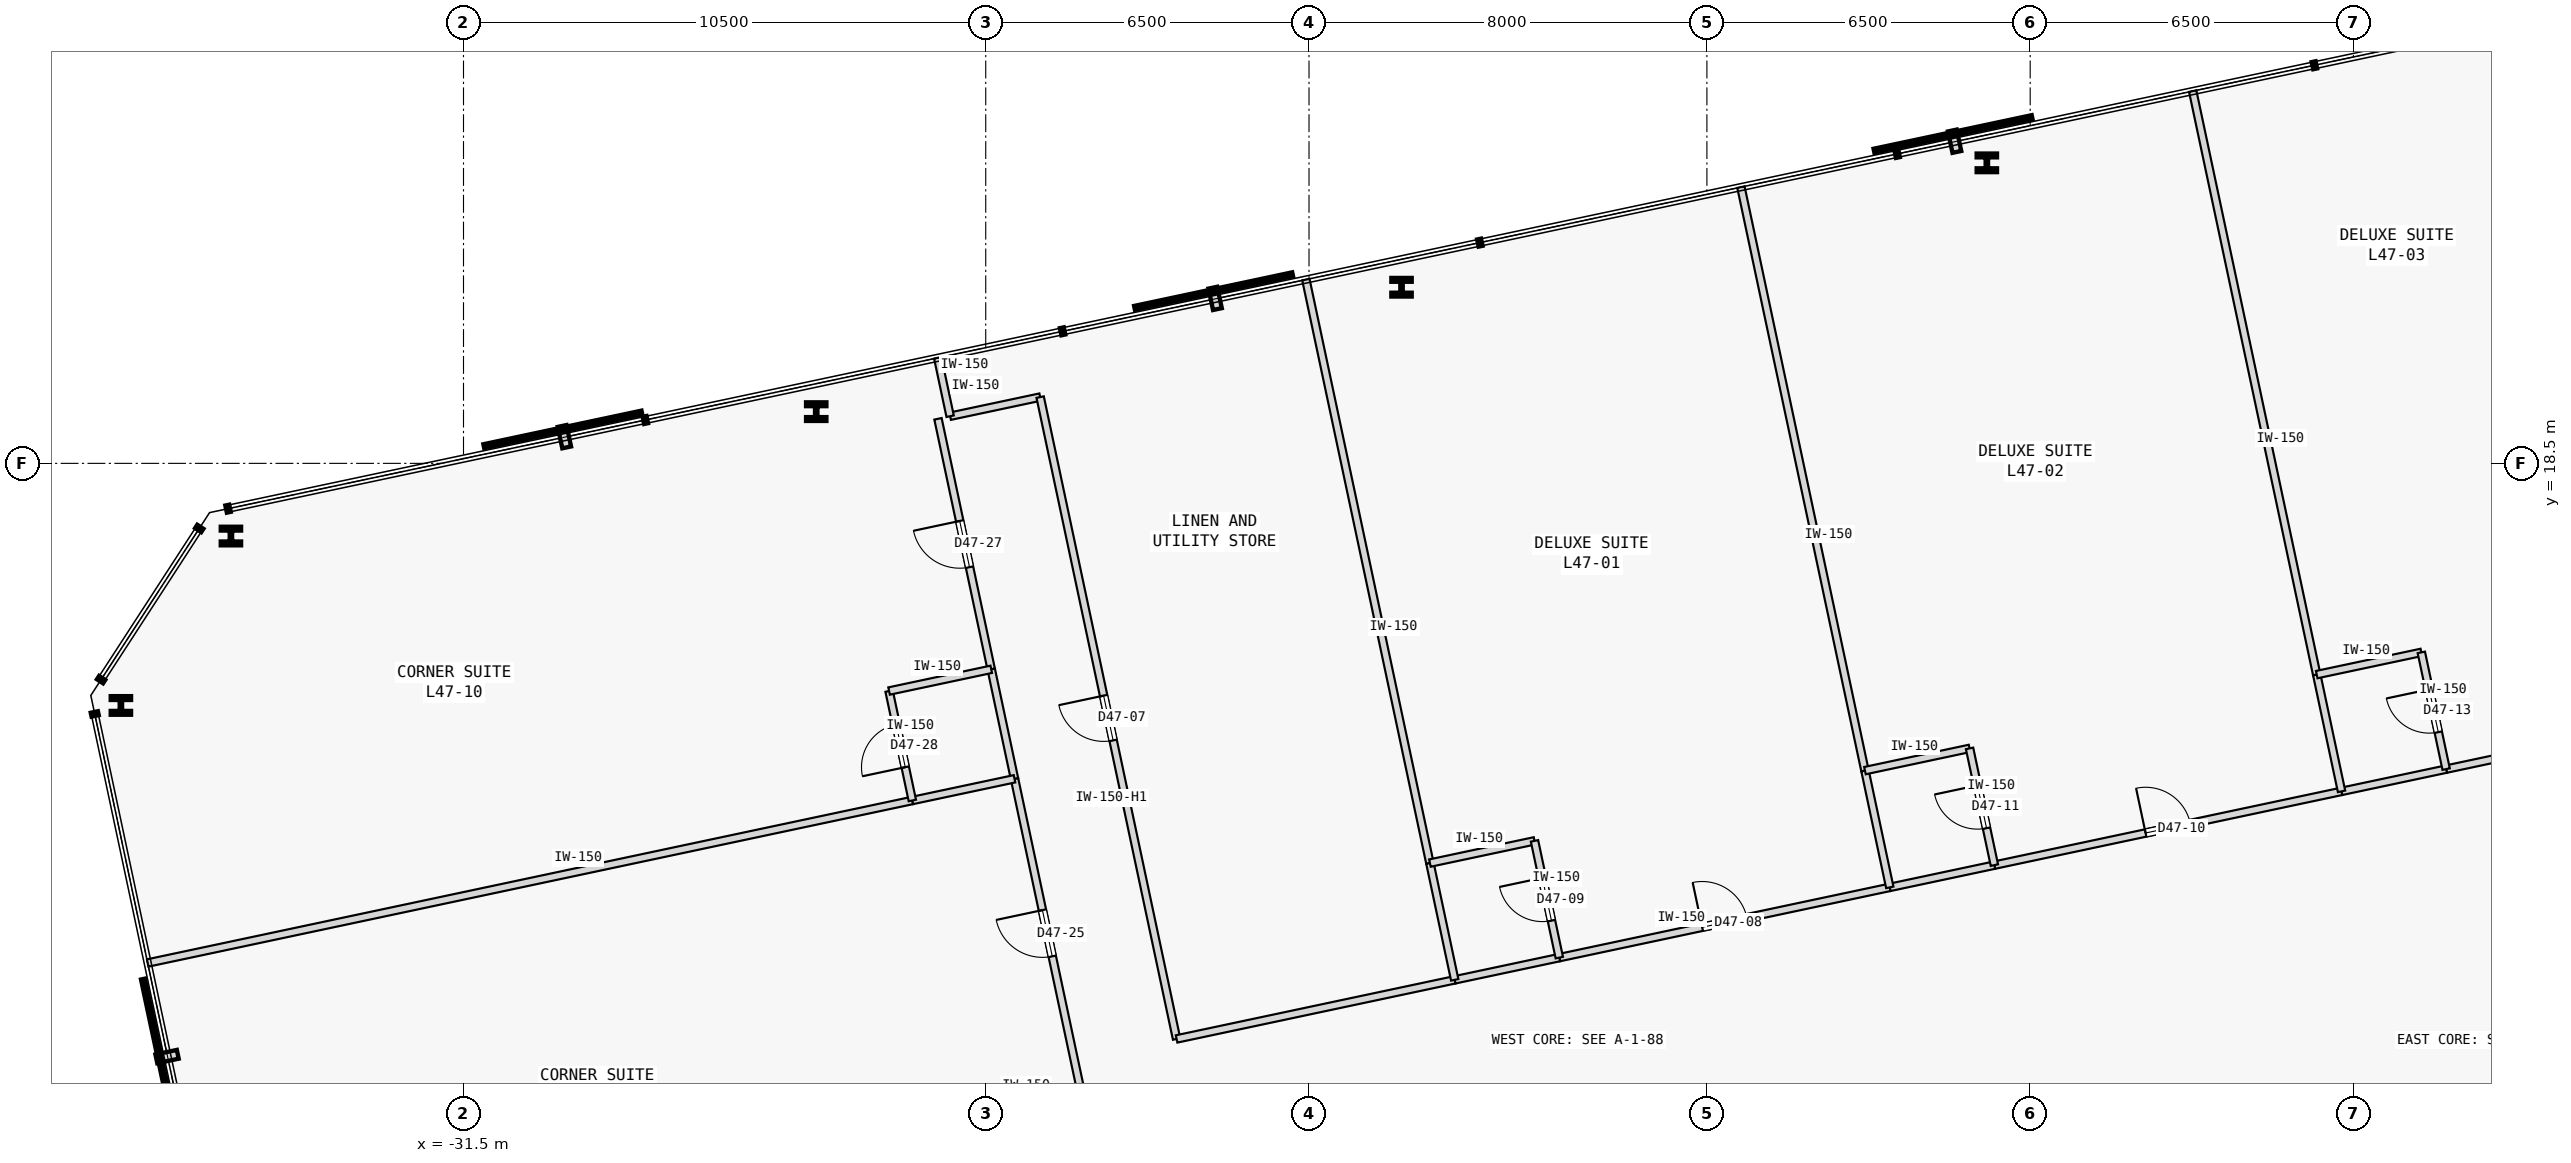
"""IFC4 building model, lengths in metres.
Left out: names, types, materials, properties, quantities, classifications, styles, units other than length and angle.
Written with IfcOpenShell. Run it as: python <this file> out.ifc"""

import sys

from ifc_helpers import new_model, si_unit, direction, frame, frame_2d, origin, origin_2d, place, context, subcontext, project, spatial, rectangle, i_section, extrude, element, fill, save


model = new_model("IFC4")
c1 = context("Model", 3, precision=1e-05, world=origin(), true_north=direction((0.0, 1.0)))
c2 = subcontext(c1, "Body", "Model", "MODEL_VIEW")
j1 = project(units=[si_unit("LENGTHUNIT", "METRE"), si_unit("PLANEANGLEUNIT", "RADIAN")], contexts=[c1])
p1 = place(None, origin())
s1 = spatial("IfcSite", under=j1, at=p1, CompositionType="ELEMENT")
p2 = place(p1, origin())
s2 = spatial("IfcBuilding", under=s1, at=p2, CompositionType="ELEMENT")
p3 = place(p2, frame((0.0, 0.0, 182.0)))
s3 = spatial("IfcBuildingStorey", under=s2, at=p3, CompositionType="ELEMENT", Elevation=182.0)
for number, where, z_axis, x_axis in (
    (1, (-0.872, 24.543, 0.0), (0.0, 0.0, 1.0), (1.0, 0.0, 0.0)),
    (2, (-12.64, 22.042, 0.0), (0.0, 0.0, 1.0), (1.0, 0.0, 0.0)),
    (3, (-24.408, 19.54, 0.0), (0.0, 0.0, 1.0), (1.0, 0.0, 0.0)),
    (4, (-36.176, 17.039, 0.0), (0.0, 0.0, 1.0), (1.0, 0.0, 0.0)),
    (5, (-38.389, 13.632, 0.0), (0.0, 0.0, 1.0), (1.0, 0.0, 0.0)),
):
    element("IfcColumn", number, at=place(p3, frame(where, z_axis=z_axis, x_axis=x_axis)), inside=s3, PredefinedType="COLUMN", context=c2, shape_type="SweptSolid", body=[
        extrude(i_section(OverallWidth=0.409, OverallDepth=0.374, WebThickness=0.048, FlangeThickness=0.077, FilletRadius=0.015, at=origin_2d()), origin(), (0.0, 0.0, 1.0), 3.4),
    ])
p4 = place(p3, frame((-21.715, 19.448, 0.0), z_axis=(0.0, 0.0, 1.0), x_axis=(0.978160192495, 0.207852442415, 0.0)))
e6 = element("IfcWall", 6, at=p4, inside=s3, PredefinedType="PARTITIONING", context=c2, shape_type="SweptSolid", body=[
    extrude(rectangle(XDim=1.85, YDim=0.15, at=frame_2d((0.925, 0.0))), origin(), (0.0, 0.0, 1.0), 3.175),
])
p5 = place(p3, frame((-17.162, 6.926, 0.0), z_axis=(0.0, 0.0, 1.0), x_axis=(-0.207911421929, 0.978147657888, 0.0)))
e7 = element("IfcWall", 7, at=p5, inside=s3, PredefinedType="PARTITIONING", context=c2, shape_type="SweptSolid", body=[
    extrude(rectangle(XDim=13.195, YDim=0.15, at=frame_2d((6.598, 0.0))), origin(), (0.0, 0.0, 1.0), 2.725),
])
p6 = place(p5, frame((6.137, 0.0, 0.0)))
e8 = element("IfcOpeningElement", 8, at=p6, cuts=e7, PredefinedType="OPENING", context=c2, shape_type="SweptSolid", body=[
    extrude(rectangle(XDim=0.92, YDim=2.15, at=frame_2d((0.46, 1.075))), frame((0.0, 0.085, 0.0), z_axis=(0.0, -1.0, 0.0), x_axis=(1.0, 0.0, 0.0)), (0.0, 0.0, 1.0), 0.17),
])
p7 = place(p3, frame((-17.162, 6.926, 0.0), z_axis=(0.0, 0.0, 1.0), x_axis=(0.978144196583, 0.207927705443, 0.0)))
e9 = element("IfcWall", 9, at=p7, inside=s3, PredefinedType="PARTITIONING", context=c2, shape_type="SweptSolid", body=[
    extrude(rectangle(XDim=5.717, YDim=0.15, at=frame_2d((2.858, 0.0))), origin(), (0.0, 0.0, 1.0), 3.175),
])
p8 = place(p3, frame((-9.467, 8.562, 0.0), z_axis=(0.0, 0.0, 1.0), x_axis=(0.978147157672, 0.207913775247, 0.0)))
e10 = element("IfcWall", 10, at=p8, inside=s3, PredefinedType="PARTITIONING", context=c2, shape_type="SweptSolid", body=[
    extrude(rectangle(XDim=6.793, YDim=0.15, at=frame_2d((3.396, 0.0))), origin(), (0.0, 0.0, 1.0), 3.175),
])
p9 = place(p8, frame((2.937, 0.0, 0.0)))
e11 = element("IfcOpeningElement", 11, at=p9, cuts=e10, PredefinedType="OPENING", context=c2, shape_type="SweptSolid", body=[
    extrude(rectangle(XDim=0.92, YDim=2.15, at=frame_2d((0.46, 1.075))), frame((0.0, 0.085, 0.0), z_axis=(0.0, -1.0, 0.0), x_axis=(1.0, 0.0, 0.0)), (0.0, 0.0, 1.0), 0.17),
])
p10 = place(p3, frame((-11.57, 8.115, 0.0), z_axis=(0.0, 0.0, 1.0), x_axis=(0.978146728319, 0.207915795165, 0.0)))
e12 = element("IfcWall", 12, at=p10, inside=s3, PredefinedType="PARTITIONING", context=c2, shape_type="SweptSolid", body=[
    extrude(rectangle(XDim=2.15, YDim=0.15, at=frame_2d((1.075, 0.0))), origin(), (0.0, 0.0, 1.0), 3.175),
])
p11 = place(p3, frame((-0.72, 10.421, 0.0), z_axis=(0.0, 0.0, 1.0), x_axis=(0.978147545754, 0.207911949477, 0.0)))
e13 = element("IfcWall", 13, at=p11, inside=s3, PredefinedType="PARTITIONING", context=c2, shape_type="SweptSolid", body=[
    extrude(rectangle(XDim=7.136, YDim=0.15, at=frame_2d((3.568, 0.0))), origin(), (0.0, 0.0, 1.0), 3.175),
])
p12 = place(p11, frame((3.108, 0.0, 0.0)))
e14 = element("IfcOpeningElement", 14, at=p12, cuts=e13, PredefinedType="OPENING", context=c2, shape_type="SweptSolid", body=[
    extrude(rectangle(XDim=0.92, YDim=2.15, at=frame_2d((0.46, 1.075))), frame((0.0, 0.085, 0.0), z_axis=(0.0, -1.0, 0.0), x_axis=(1.0, 0.0, 0.0)), (0.0, 0.0, 1.0), 0.17),
])
p13 = place(p3, frame((-2.823, 9.974, 0.0), z_axis=(0.0, 0.0, 1.0), x_axis=(0.978146728319, 0.207915795165, 0.0)))
e15 = element("IfcWall", 15, at=p13, inside=s3, PredefinedType="PARTITIONING", context=c2, shape_type="SweptSolid", body=[
    extrude(rectangle(XDim=2.15, YDim=0.15, at=frame_2d((1.075, 0.0))), origin(), (0.0, 0.0, 1.0), 3.175),
])
p14 = place(p3, frame((8.363, 12.352, 0.0), z_axis=(0.0, 0.0, 1.0), x_axis=(0.978153723809, 0.20788288193, 0.0)))
e16 = element("IfcWall", 16, at=p14, inside=s3, PredefinedType="PARTITIONING", context=c2, shape_type="SweptSolid", body=[
    extrude(rectangle(XDim=4.599, YDim=0.15, at=frame_2d((2.3, 0.0))), origin(), (0.0, 0.0, 1.0), 3.175),
])
p15 = place(p3, frame((6.26, 11.905, 0.0), z_axis=(0.0, 0.0, 1.0), x_axis=(0.978146728319, 0.207915795165, 0.0)))
e17 = element("IfcWall", 17, at=p15, inside=s3, PredefinedType="PARTITIONING", context=c2, shape_type="SweptSolid", body=[
    extrude(rectangle(XDim=2.15, YDim=0.15, at=frame_2d((1.075, 0.0))), origin(), (0.0, 0.0, 1.0), 3.175),
])
p16 = place(p3, frame((-19.101, 5.946, 0.0), z_axis=(0.0, 0.0, 1.0), x_axis=(-0.207916691923, 0.978146537703, 0.0)))
e18 = element("IfcWall", 18, at=p16, inside=s3, PredefinedType="PARTITIONING", context=c2, shape_type="SweptSolid", body=[
    extrude(rectangle(XDim=6.35, YDim=0.15, at=frame_2d((3.175, 0.0))), origin(), (0.0, 0.0, 1.0), 3.175),
])
p17 = place(p16, frame((2.7, 0.0, 0.0)))
e19 = element("IfcOpeningElement", 19, at=p17, cuts=e18, PredefinedType="OPENING", context=c2, shape_type="SweptSolid", body=[
    extrude(rectangle(XDim=0.95, YDim=2.15, at=frame_2d((0.475, 1.075))), frame((0.0, 0.085, 0.0), z_axis=(0.0, -1.0, 0.0), x_axis=(1.0, 0.0, 0.0)), (0.0, 0.0, 1.0), 0.17),
])
p18 = place(p3, frame((-20.889, 14.358, 0.0), z_axis=(0.0, 0.0, 1.0), x_axis=(-0.207916584961, 0.978146560439, 0.0)))
e20 = element("IfcWall", 20, at=p18, inside=s3, PredefinedType="PARTITIONING", context=c2, shape_type="SweptSolid", body=[
    extrude(rectangle(XDim=5.15, YDim=0.15, at=frame_2d((2.575, 0.0))), origin(), (0.0, 0.0, 1.0), 3.175),
])
p19 = place(p18, frame((2.1, 0.0, 0.0)))
e21 = element("IfcOpeningElement", 21, at=p19, cuts=e20, PredefinedType="OPENING", context=c2, shape_type="SweptSolid", body=[
    extrude(rectangle(XDim=0.95, YDim=2.15, at=frame_2d((0.475, 1.075))), frame((0.0, 0.085, 0.0), z_axis=(0.0, -1.0, 0.0), x_axis=(1.0, 0.0, 0.0)), (0.0, 0.0, 1.0), 0.17),
])
p20 = place(p3, frame((-20.421, 12.158, 0.0), z_axis=(0.0, 0.0, 1.0), x_axis=(-0.207913264065, 0.978147266328, 0.0)))
e22 = element("IfcWall", 22, at=p20, inside=s3, PredefinedType="PARTITIONING", context=c2, shape_type="SweptSolid", body=[
    extrude(rectangle(XDim=2.25, YDim=0.15, at=frame_2d((1.125, 0.0))), origin(), (0.0, 0.0, 1.0), 3.175),
])
p21 = place(p3, frame((-12.069, 10.462, 0.0), z_axis=(0.0, 0.0, 1.0), x_axis=(-0.207914988081, 0.978146899873, 0.0)))
e23 = element("IfcWall", 23, at=p21, inside=s3, PredefinedType="PARTITIONING", context=c2, shape_type="SweptSolid", body=[
    extrude(rectangle(XDim=11.995, YDim=0.15, at=frame_2d((5.998, 0.0))), origin(), (0.0, 0.0, 1.0), 3.175),
])
p22 = place(p3, frame((-11.57, 8.115, 0.0), z_axis=(0.0, 0.0, 1.0), x_axis=(-0.207917150959, 0.978146440129, 0.0)))
e24 = element("IfcWall", 24, at=p22, inside=s3, PredefinedType="PARTITIONING", context=c2, shape_type="SweptSolid", body=[
    extrude(rectangle(XDim=2.4, YDim=0.15, at=frame_2d((1.2, 0.0))), origin(), (0.0, 0.0, 1.0), 3.175),
])
p23 = place(p3, frame((-21.715, 19.448, 0.0), z_axis=(0.0, 0.0, 1.0), x_axis=(-0.20795853359, 0.978137642823, 0.0)))
e25 = element("IfcWall", 25, at=p23, inside=s3, PredefinedType="PARTITIONING", context=c2, shape_type="SweptSolid", body=[
    extrude(rectangle(XDim=1.2, YDim=0.15, at=frame_2d((0.6, 0.0))), origin(), (0.0, 0.0, 1.0), 3.175),
])
p24 = place(p3, frame((-12.069, 10.462, 0.0), z_axis=(0.0, 0.0, 1.0), x_axis=(0.978146728319, 0.207915795165, 0.0)))
e26 = element("IfcWall", 26, at=p24, inside=s3, PredefinedType="PARTITIONING", context=c2, shape_type="SweptSolid", body=[
    extrude(rectangle(XDim=2.15, YDim=0.15, at=frame_2d((1.075, 0.0))), origin(), (0.0, 0.0, 1.0), 3.175),
])
p25 = place(p3, frame((-9.467, 8.562, 0.0), z_axis=(0.0, 0.0, 1.0), x_axis=(-0.207917150959, 0.978146440129, 0.0)))
e27 = element("IfcWall", 27, at=p25, inside=s3, PredefinedType="PARTITIONING", context=c2, shape_type="SweptSolid", body=[
    extrude(rectangle(XDim=2.4, YDim=0.15, at=frame_2d((1.2, 0.0))), origin(), (0.0, 0.0, 1.0), 3.175),
])
p26 = place(p25, frame((0.76, 0.0, 0.0)))
e28 = element("IfcOpeningElement", 28, at=p26, cuts=e27, PredefinedType="OPENING", context=c2, shape_type="SweptSolid", body=[
    extrude(rectangle(XDim=0.88, YDim=2.15, at=frame_2d((0.44, 1.075))), frame((0.0, 0.085, 0.0), z_axis=(0.0, -1.0, 0.0), x_axis=(1.0, 0.0, 0.0)), (0.0, 0.0, 1.0), 0.17),
])
p27 = place(p3, frame((-3.322, 12.321, 0.0), z_axis=(0.0, 0.0, 1.0), x_axis=(-0.207910848762, 0.978147779718, 0.0)))
e29 = element("IfcWall", 29, at=p27, inside=s3, PredefinedType="PARTITIONING", context=c2, shape_type="SweptSolid", body=[
    extrude(rectangle(XDim=11.995, YDim=0.15, at=frame_2d((5.998, 0.0))), origin(), (0.0, 0.0, 1.0), 3.175),
])
p28 = place(p3, frame((-2.823, 9.974, 0.0), z_axis=(0.0, 0.0, 1.0), x_axis=(-0.207937840262, 0.978142042133, 0.0)))
e30 = element("IfcWall", 30, at=p28, inside=s3, PredefinedType="PARTITIONING", context=c2, shape_type="SweptSolid", body=[
    extrude(rectangle(XDim=2.4, YDim=0.15, at=frame_2d((1.2, 0.0))), origin(), (0.0, 0.0, 1.0), 3.175),
])
p29 = place(p3, frame((-3.322, 12.321, 0.0), z_axis=(0.0, 0.0, 1.0), x_axis=(0.978146728319, 0.207915795165, 0.0)))
e31 = element("IfcWall", 31, at=p29, inside=s3, PredefinedType="PARTITIONING", context=c2, shape_type="SweptSolid", body=[
    extrude(rectangle(XDim=2.15, YDim=0.15, at=frame_2d((1.075, 0.0))), origin(), (0.0, 0.0, 1.0), 3.175),
])
p30 = place(p3, frame((-0.72, 10.421, 0.0), z_axis=(0.0, 0.0, 1.0), x_axis=(-0.207937840262, 0.978142042133, 0.0)))
e32 = element("IfcWall", 32, at=p30, inside=s3, PredefinedType="PARTITIONING", context=c2, shape_type="SweptSolid", body=[
    extrude(rectangle(XDim=2.4, YDim=0.15, at=frame_2d((1.2, 0.0))), origin(), (0.0, 0.0, 1.0), 3.175),
])
p31 = place(p30, frame((0.76, 0.0, 0.0)))
e33 = element("IfcOpeningElement", 33, at=p31, cuts=e32, PredefinedType="OPENING", context=c2, shape_type="SweptSolid", body=[
    extrude(rectangle(XDim=0.88, YDim=2.15, at=frame_2d((0.44, 1.075))), frame((0.0, 0.085, 0.0), z_axis=(0.0, -1.0, 0.0), x_axis=(1.0, 0.0, 0.0)), (0.0, 0.0, 1.0), 0.17),
])
p32 = place(p3, frame((5.761, 14.252, 0.0), z_axis=(0.0, 0.0, 1.0), x_axis=(-0.207910848762, 0.978147779718, 0.0)))
e34 = element("IfcWall", 34, at=p32, inside=s3, PredefinedType="PARTITIONING", context=c2, shape_type="SweptSolid", body=[
    extrude(rectangle(XDim=11.995, YDim=0.15, at=frame_2d((5.998, 0.0))), origin(), (0.0, 0.0, 1.0), 3.175),
])
p33 = place(p3, frame((6.26, 11.905, 0.0), z_axis=(0.0, 0.0, 1.0), x_axis=(-0.207917150959, 0.978146440129, 0.0)))
e35 = element("IfcWall", 35, at=p33, inside=s3, PredefinedType="PARTITIONING", context=c2, shape_type="SweptSolid", body=[
    extrude(rectangle(XDim=2.4, YDim=0.15, at=frame_2d((1.2, 0.0))), origin(), (0.0, 0.0, 1.0), 3.175),
])
p34 = place(p3, frame((5.761, 14.252, 0.0), z_axis=(0.0, 0.0, 1.0), x_axis=(0.978146728319, 0.207915795165, 0.0)))
e36 = element("IfcWall", 36, at=p34, inside=s3, PredefinedType="PARTITIONING", context=c2, shape_type="SweptSolid", body=[
    extrude(rectangle(XDim=2.15, YDim=0.15, at=frame_2d((1.075, 0.0))), origin(), (0.0, 0.0, 1.0), 3.175),
])
p35 = place(p3, frame((8.363, 12.352, 0.0), z_axis=(0.0, 0.0, 1.0), x_axis=(-0.207917150959, 0.978146440129, 0.0)))
e37 = element("IfcWall", 37, at=p35, inside=s3, PredefinedType="PARTITIONING", context=c2, shape_type="SweptSolid", body=[
    extrude(rectangle(XDim=2.4, YDim=0.15, at=frame_2d((1.2, 0.0))), origin(), (0.0, 0.0, 1.0), 3.175),
])
p36 = place(p35, frame((0.76, 0.0, 0.0)))
e38 = element("IfcOpeningElement", 38, at=p36, cuts=e37, PredefinedType="OPENING", context=c2, shape_type="SweptSolid", body=[
    extrude(rectangle(XDim=0.88, YDim=2.15, at=frame_2d((0.44, 1.075))), frame((0.0, 0.085, 0.0), z_axis=(0.0, -1.0, 0.0), x_axis=(1.0, 0.0, 0.0)), (0.0, 0.0, 1.0), 0.17),
])
p37 = place(p3, frame((-37.85, 8.453, 0.0), z_axis=(0.0, 0.0, 1.0), x_axis=(0.978149296727, 0.207903711638, 0.0)))
e39 = element("IfcWall", 39, at=p37, inside=s3, PredefinedType="PARTITIONING", context=c2, shape_type="SweptSolid", body=[
    extrude(rectangle(XDim=15.718, YDim=0.15, at=frame_2d((7.859, 0.0))), origin(), (0.0, 0.0, 1.0), 3.175),
])
p38 = place(p3, frame((-22.476, 11.721, 0.0), z_axis=(0.0, 0.0, 1.0), x_axis=(0.978134617382, 0.207972763311, 0.0)))
e40 = element("IfcWall", 40, at=p38, inside=s3, PredefinedType="PARTITIONING", context=c2, shape_type="SweptSolid", body=[
    extrude(rectangle(XDim=2.1, YDim=0.15, at=frame_2d((1.05, 0.0))), origin(), (0.0, 0.0, 1.0), 3.175),
])
p39 = place(p3, frame((-22.476, 11.721, 0.0), z_axis=(0.0, 0.0, 1.0), x_axis=(-0.207891197838, 0.978151956427, 0.0)))
e41 = element("IfcWall", 41, at=p39, inside=s3, PredefinedType="PARTITIONING", context=c2, shape_type="SweptSolid", body=[
    extrude(rectangle(XDim=2.25, YDim=0.15, at=frame_2d((1.125, 0.0))), origin(), (0.0, 0.0, 1.0), 3.175),
])
p40 = place(p39, frame((0.685, 0.0, 0.0)))
e42 = element("IfcOpeningElement", 42, at=p40, cuts=e41, PredefinedType="OPENING", context=c2, shape_type="SweptSolid", body=[
    extrude(rectangle(XDim=0.88, YDim=2.15, at=frame_2d((0.44, 1.075))), frame((0.0, 0.085, 0.0), z_axis=(0.0, -1.0, 0.0), x_axis=(1.0, 0.0, 0.0)), (0.0, 0.0, 1.0), 0.17),
])
p41 = place(p3, frame((-22.943, 13.922, 0.0), z_axis=(0.0, 0.0, 1.0), x_axis=(0.97815826, 0.207861536591, 0.0)))
e43 = element("IfcWall", 43, at=p41, inside=s3, PredefinedType="PARTITIONING", context=c2, shape_type="SweptSolid", body=[
    extrude(rectangle(XDim=2.1, YDim=0.15, at=frame_2d((1.05, 0.0))), origin(), (0.0, 0.0, 1.0), 3.175),
])
p42 = place(p6, origin())
e44 = element("IfcDoor", 44, at=p42, inside=s3, OperationType="SINGLE_SWING_RIGHT", PredefinedType="DOOR", context=c2, shape_type="SweptSolid", body=[
    extrude(rectangle(XDim=0.92, YDim=2.15, at=frame_2d((0.46, 1.075))), frame((0.0, 0.025, 0.0), z_axis=(0.0, -1.0, 0.0), x_axis=(1.0, 0.0, 0.0)), (0.0, 0.0, 1.0), 0.05),
])
fill(e8, e44)
p43 = place(p9, origin())
e45 = element("IfcDoor", 45, at=p43, inside=s3, OperationType="SINGLE_SWING_LEFT", PredefinedType="DOOR", context=c2, shape_type="SweptSolid", body=[
    extrude(rectangle(XDim=0.92, YDim=2.15, at=frame_2d((0.46, 1.075))), frame((0.0, 0.025, 0.0), z_axis=(0.0, -1.0, 0.0), x_axis=(1.0, 0.0, 0.0)), (0.0, 0.0, 1.0), 0.05),
])
fill(e11, e45)
p44 = place(p26, origin())
e46 = element("IfcDoor", 46, at=p44, inside=s3, OperationType="SINGLE_SWING_RIGHT", PredefinedType="DOOR", context=c2, shape_type="SweptSolid", body=[
    extrude(rectangle(XDim=0.88, YDim=2.15, at=frame_2d((0.44, 1.075))), frame((0.0, 0.025, 0.0), z_axis=(0.0, -1.0, 0.0), x_axis=(1.0, 0.0, 0.0)), (0.0, 0.0, 1.0), 0.05),
])
fill(e28, e46)
p45 = place(p12, origin())
e47 = element("IfcDoor", 47, at=p45, inside=s3, OperationType="SINGLE_SWING_LEFT", PredefinedType="DOOR", context=c2, shape_type="SweptSolid", body=[
    extrude(rectangle(XDim=0.92, YDim=2.15, at=frame_2d((0.46, 1.075))), frame((0.0, 0.025, 0.0), z_axis=(0.0, -1.0, 0.0), x_axis=(1.0, 0.0, 0.0)), (0.0, 0.0, 1.0), 0.05),
])
fill(e14, e47)
p46 = place(p31, origin())
e48 = element("IfcDoor", 48, at=p46, inside=s3, OperationType="SINGLE_SWING_RIGHT", PredefinedType="DOOR", context=c2, shape_type="SweptSolid", body=[
    extrude(rectangle(XDim=0.88, YDim=2.15, at=frame_2d((0.44, 1.075))), frame((0.0, 0.025, 0.0), z_axis=(0.0, -1.0, 0.0), x_axis=(1.0, 0.0, 0.0)), (0.0, 0.0, 1.0), 0.05),
])
fill(e33, e48)
p47 = place(p36, origin())
e49 = element("IfcDoor", 49, at=p47, inside=s3, OperationType="SINGLE_SWING_RIGHT", PredefinedType="DOOR", context=c2, shape_type="SweptSolid", body=[
    extrude(rectangle(XDim=0.88, YDim=2.15, at=frame_2d((0.44, 1.075))), frame((0.0, 0.025, 0.0), z_axis=(0.0, -1.0, 0.0), x_axis=(1.0, 0.0, 0.0)), (0.0, 0.0, 1.0), 0.05),
])
fill(e38, e49)
p48 = place(p17, origin())
e50 = element("IfcDoor", 50, at=p48, inside=s3, OperationType="SINGLE_SWING_RIGHT", PredefinedType="DOOR", context=c2, shape_type="SweptSolid", body=[
    extrude(rectangle(XDim=0.95, YDim=2.15, at=frame_2d((0.475, 1.075))), frame((0.0, 0.025, 0.0), z_axis=(0.0, -1.0, 0.0), x_axis=(1.0, 0.0, 0.0)), (0.0, 0.0, 1.0), 0.05),
])
fill(e19, e50)
p49 = place(p19, origin())
e51 = element("IfcDoor", 51, at=p49, inside=s3, OperationType="SINGLE_SWING_RIGHT", PredefinedType="DOOR", context=c2, shape_type="SweptSolid", body=[
    extrude(rectangle(XDim=0.95, YDim=2.15, at=frame_2d((0.475, 1.075))), frame((0.0, 0.025, 0.0), z_axis=(0.0, -1.0, 0.0), x_axis=(1.0, 0.0, 0.0)), (0.0, 0.0, 1.0), 0.05),
])
fill(e21, e51)
p50 = place(p40, origin())
e52 = element("IfcDoor", 52, at=p50, inside=s3, OperationType="SINGLE_SWING_LEFT", PredefinedType="DOOR", context=c2, shape_type="SweptSolid", body=[
    extrude(rectangle(XDim=0.88, YDim=2.15, at=frame_2d((0.44, 1.075))), frame((0.0, 0.025, 0.0), z_axis=(0.0, -1.0, 0.0), x_axis=(1.0, 0.0, 0.0)), (0.0, 0.0, 1.0), 0.05),
])
fill(e42, e52)
save(model, sys.argv[1])
